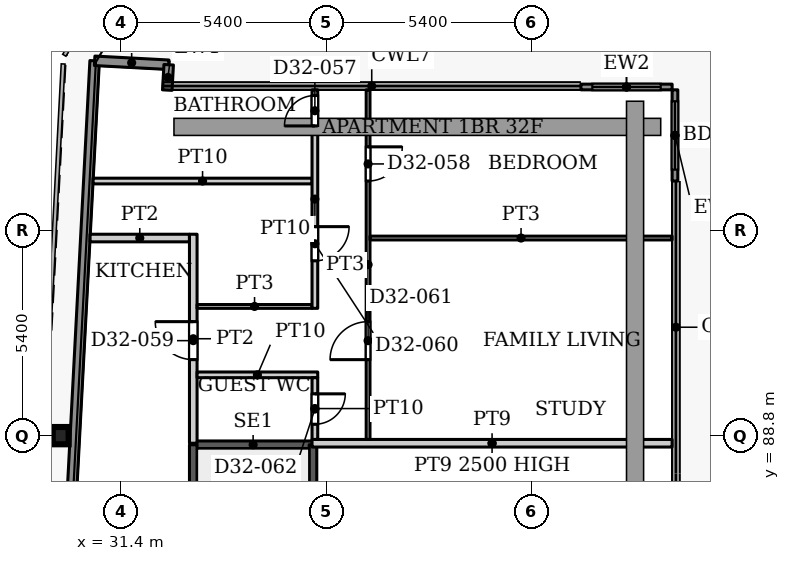
"""IFC4 building model, lengths in metres.
Left out: names, types, materials, properties, quantities, classifications, styles, units other than length and angle.
Written with IfcOpenShell. Run it as: python <this file> out.ifc"""

import sys

from ifc_helpers import new_model, si_unit, direction, frame, frame_2d, origin, origin_2d, place, context, subcontext, project, spatial, rectangle, i_section, extrude, source, transform, mapped, element, fill, save


model = new_model("IFC4")
c1 = context("Model", 3, precision=1e-05, world=origin(), true_north=direction((0.0, 1.0)))
c2 = subcontext(c1, "Body", "Model", "MODEL_VIEW")
j1 = project(units=[si_unit("LENGTHUNIT", "METRE"), si_unit("PLANEANGLEUNIT", "RADIAN")], contexts=[c1])
p1 = place(None, origin())
s1 = spatial("IfcSite", under=j1, at=p1, CompositionType="ELEMENT")
p2 = place(p1, origin())
s2 = spatial("IfcBuilding", under=s1, at=p2, CompositionType="ELEMENT")
p3 = place(p2, frame((0.0, 0.0, 137.0)))
s3 = spatial("IfcBuildingStorey", under=s2, at=p3, CompositionType="ELEMENT", Elevation=137.0)
p4 = place(p3, frame((29.811, 88.8, 0.0), z_axis=(0.0, 0.0, 1.0), x_axis=(1.0, 0.0, 0.0)))
e1 = element("IfcColumn", 1, at=p4, inside=s3, PredefinedType="COLUMN", context=c2, shape_type="SweptSolid", body=[
    extrude(i_section(OverallWidth=0.418, OverallDepth=0.455, WebThickness=0.042, FlangeThickness=0.068, FilletRadius=0.014, at=origin_2d()), origin(), (0.0, 0.0, 1.0), 3.9),
])
p5 = place(p3, frame((27.195, 31.969, 0.0), z_axis=(0.0, 0.0, 1.0), x_axis=(0.052554995867, 0.998618031286, 0.0)))
e2 = element("IfcWall", 2, at=p5, inside=s3, PredefinedType="SOLIDWALL", context=c2, shape_type="SweptSolid", body=[
    extrude(rectangle(XDim=66.787, YDim=0.25, at=frame_2d((33.394, 0.0))), origin(), (0.0, 0.0, 1.0), 3.75),
])
p6 = place(p3, frame((30.705, 98.664, 0.0), z_axis=(0.0, 0.0, 1.0), x_axis=(0.998577785791, -0.053314216913, 0.0)))
e3 = element("IfcWall", 3, at=p6, inside=s3, PredefinedType="SOLIDWALL", context=c2, shape_type="SweptSolid", body=[
    extrude(rectangle(XDim=1.951, YDim=0.25, at=frame_2d((0.975, 0.0))), origin(), (0.0, 0.0, 1.0), 3.75),
])
p7 = place(p3, frame((32.653, 98.56, 0.0), z_axis=(0.0, 0.0, 1.0), x_axis=(-0.054093451632, -0.998535877418, 0.0)))
e4 = element("IfcWall", 4, at=p7, inside=s3, PredefinedType="SOLIDWALL", context=c2, shape_type="SweptSolid", body=[
    extrude(rectangle(XDim=0.668, YDim=0.25, at=frame_2d((0.334, 0.0))), origin(), (0.0, 0.0, 1.0), 3.75),
])
p8 = place(p3, frame((43.5, 97.975, 0.0), z_axis=(0.0, 0.0, 1.0), x_axis=(1.0, 0.0, 0.0)))
e5 = element("IfcWall", 5, at=p8, inside=s3, PredefinedType="SOLIDWALL", context=c2, shape_type="SweptSolid", body=[
    extrude(rectangle(XDim=2.4, YDim=0.15, at=frame_2d((1.2, 0.0))), origin(), (0.0, 0.0, 1.0), 3.75),
])
p9 = place(p8, frame((0.3, 0.0, 0.0)))
e6 = element("IfcOpeningElement", 6, at=p9, cuts=e5, PredefinedType="OPENING", context=c2, shape_type="SweptSolid", body=[
    extrude(rectangle(XDim=1.8, YDim=2.4, at=frame_2d((0.9, 1.2))), frame((0.0, 0.085, 0.0), z_axis=(0.0, -1.0, 0.0), x_axis=(1.0, 0.0, 0.0)), (0.0, 0.0, 1.0), 0.17),
])
p10 = place(p3, frame((45.975, 97.9, 0.0), z_axis=(0.0, 0.0, 1.0), x_axis=(0.0, -1.0, 0.0)))
e7 = element("IfcWall", 7, at=p10, inside=s3, PredefinedType="SOLIDWALL", context=c2, shape_type="SweptSolid", body=[
    extrude(rectangle(XDim=2.4, YDim=0.15, at=frame_2d((1.2, 0.0))), origin(), (0.0, 0.0, 1.0), 3.75),
])
p11 = place(p10, frame((0.3, 0.0, 0.0)))
e8 = element("IfcOpeningElement", 8, at=p11, cuts=e7, PredefinedType="OPENING", context=c2, shape_type="SweptSolid", body=[
    extrude(rectangle(XDim=1.8, YDim=2.4, at=frame_2d((0.9, 1.2))), frame((0.0, 0.085, 0.0), z_axis=(0.0, -1.0, 0.0), x_axis=(1.0, 0.0, 0.0)), (0.0, 0.0, 1.0), 0.17),
])
p12 = place(p3, frame((33.3, 88.56, 0.0), z_axis=(0.0, 0.0, 1.0), x_axis=(1.0, 0.0, 0.0)))
e9 = element("IfcWall", 9, at=p12, inside=s3, PredefinedType="SHEAR", context=c2, shape_type="SweptSolid", body=[
    extrude(rectangle(XDim=3.15, YDim=0.2, at=frame_2d((1.575, 0.0))), origin(), (0.0, 0.0, 1.0), 3.9),
])
p13 = place(p3, frame((33.3, 79.4, 0.0), z_axis=(0.0, 0.0, 1.0), x_axis=(0.0, 1.0, 0.0)))
e10 = element("IfcWall", 10, at=p13, inside=s3, PredefinedType="SHEAR", context=c2, shape_type="SweptSolid", body=[
    extrude(rectangle(XDim=9.16, YDim=0.2, at=frame_2d((4.58, 0.0))), origin(), (0.0, 0.0, 1.0), 3.9),
])
p14 = place(p13, frame((0.35, 0.0, 0.0)))
e11 = element("IfcOpeningElement", 11, at=p14, cuts=e10, PredefinedType="OPENING", context=c2, shape_type="SweptSolid", body=[
    extrude(rectangle(XDim=1.1, YDim=2.2, at=frame_2d((0.55, 1.1))), frame((0.0, 0.11, 0.0), z_axis=(0.0, -1.0, 0.0), x_axis=(1.0, 0.0, 0.0)), (0.0, 0.0, 1.0), 0.22),
])
p15 = place(p3, frame((36.45, 79.4, 0.0), z_axis=(0.0, 0.0, 1.0), x_axis=(0.0, 1.0, 0.0)))
e12 = element("IfcWall", 12, at=p15, inside=s3, PredefinedType="SHEAR", context=c2, shape_type="SweptSolid", body=[
    extrude(rectangle(XDim=9.16, YDim=0.2, at=frame_2d((4.58, 0.0))), origin(), (0.0, 0.0, 1.0), 3.9),
])
p16 = place(p3, frame((30.664, 95.5, 0.0), z_axis=(0.0, 0.0, 1.0), x_axis=(1.0, 0.0, 0.0)))
e13 = element("IfcWall", 13, at=p16, inside=s3, PredefinedType="PARTITIONING", context=c2, shape_type="SweptSolid", body=[
    extrude(rectangle(XDim=5.761, YDim=0.15, at=frame_2d((2.88, 0.0))), origin(), (0.0, 0.0, 1.0), 3.6),
])
p17 = place(p3, frame((30.585, 94.0, 0.0), z_axis=(0.0, 0.0, 1.0), x_axis=(1.0, 0.0, 0.0)))
e14 = element("IfcWall", 14, at=p17, inside=s3, PredefinedType="PARTITIONING", context=c2, shape_type="SweptSolid", body=[
    extrude(rectangle(XDim=2.615, YDim=0.2, at=frame_2d((1.308, 0.0))), origin(), (0.0, 0.0, 1.0), 3.6),
])
p18 = place(p3, frame((33.3, 88.6, 0.0), z_axis=(0.0, 0.0, 1.0), x_axis=(0.0, 1.0, 0.0)))
e15 = element("IfcWall", 15, at=p18, inside=s3, PredefinedType="PARTITIONING", context=c2, shape_type="SweptSolid", body=[
    extrude(rectangle(XDim=5.5, YDim=0.2, at=frame_2d((2.75, 0.0))), origin(), (0.0, 0.0, 1.0), 3.6),
])
p19 = place(p18, frame((2.2, 0.0, 0.0)))
e16 = element("IfcOpeningElement", 16, at=p19, cuts=e15, PredefinedType="OPENING", context=c2, shape_type="SweptSolid", body=[
    extrude(rectangle(XDim=1.0, YDim=2.1, at=frame_2d((0.5, 1.05))), frame((0.0, 0.11, 0.0), z_axis=(0.0, -1.0, 0.0), x_axis=(1.0, 0.0, 0.0)), (0.0, 0.0, 1.0), 0.22),
])
p20 = place(p3, frame((33.4, 90.4, 0.0), z_axis=(0.0, 0.0, 1.0), x_axis=(1.0, 0.0, 0.0)))
e17 = element("IfcWall", 17, at=p20, inside=s3, PredefinedType="PARTITIONING", context=c2, shape_type="SweptSolid", body=[
    extrude(rectangle(XDim=3.175, YDim=0.15, at=frame_2d((1.587, 0.0))), origin(), (0.0, 0.0, 1.0), 3.6),
])
p21 = place(p3, frame((33.4, 92.2, 0.0), z_axis=(0.0, 0.0, 1.0), x_axis=(1.0, 0.0, 0.0)))
e18 = element("IfcWall", 18, at=p21, inside=s3, PredefinedType="PARTITIONING", context=c2, shape_type="SweptSolid", body=[
    extrude(rectangle(XDim=3.025, YDim=0.1, at=frame_2d((1.513, 0.0))), origin(), (0.0, 0.0, 1.0), 3.6),
])
p22 = place(p3, frame((36.425, 88.6, 0.0), z_axis=(0.0, 0.0, 1.0), x_axis=(1.0, 0.0, 0.0)))
e19 = element("IfcWall", 19, at=p22, inside=s3, PredefinedType="PARTITIONING", context=c2, shape_type="SweptSolid", body=[
    extrude(rectangle(XDim=9.475, YDim=0.2, at=frame_2d((4.737, 0.0))), origin(), (0.0, 0.0, 1.0), 2.5),
])
p23 = place(p3, frame((36.5, 88.7, 0.0), z_axis=(0.0, 0.0, 1.0), x_axis=(0.0, 1.0, 0.0)))
e20 = element("IfcWall", 20, at=p23, inside=s3, PredefinedType="PARTITIONING", context=c2, shape_type="SweptSolid", body=[
    extrude(rectangle(XDim=1.625, YDim=0.15, at=frame_2d((0.812, 0.0))), origin(), (0.0, 0.0, 1.0), 3.6),
])
p24 = place(p23, frame((0.4, 0.0, 0.0)))
e21 = element("IfcOpeningElement", 21, at=p24, cuts=e20, PredefinedType="OPENING", context=c2, shape_type="SweptSolid", body=[
    extrude(rectangle(XDim=0.8, YDim=2.1, at=frame_2d((0.4, 1.05))), frame((0.0, 0.085, 0.0), z_axis=(0.0, -1.0, 0.0), x_axis=(1.0, 0.0, 0.0)), (0.0, 0.0, 1.0), 0.17),
])
p25 = place(p3, frame((36.5, 92.15, 0.0), z_axis=(0.0, 0.0, 1.0), x_axis=(0.0, 1.0, 0.0)))
e22 = element("IfcWall", 22, at=p25, inside=s3, PredefinedType="PARTITIONING", context=c2, shape_type="SweptSolid", body=[
    extrude(rectangle(XDim=5.75, YDim=0.15, at=frame_2d((2.875, 0.0))), origin(), (0.0, 0.0, 1.0), 3.6),
])
p26 = place(p25, frame((4.8, 0.0, 0.0)))
e23 = element("IfcOpeningElement", 23, at=p26, cuts=e22, PredefinedType="OPENING", context=c2, shape_type="SweptSolid", body=[
    extrude(rectangle(XDim=0.8, YDim=2.1, at=frame_2d((0.4, 1.05))), frame((0.0, 0.085, 0.0), z_axis=(0.0, -1.0, 0.0), x_axis=(1.0, 0.0, 0.0)), (0.0, 0.0, 1.0), 0.17),
])
p27 = place(p25, frame((1.25, 0.0, 0.0)))
e24 = element("IfcOpeningElement", 24, at=p27, cuts=e22, PredefinedType="OPENING", context=c2, shape_type="SweptSolid", body=[
    extrude(rectangle(XDim=0.9, YDim=2.1, at=frame_2d((0.45, 1.05))), frame((0.0, 0.085, 0.0), z_axis=(0.0, -1.0, 0.0), x_axis=(1.0, 0.0, 0.0)), (0.0, 0.0, 1.0), 0.17),
])
p28 = place(p3, frame((37.9, 88.7, 0.0), z_axis=(0.0, 0.0, 1.0), x_axis=(0.0, 1.0, 0.0)))
e25 = element("IfcWall", 25, at=p28, inside=s3, PredefinedType="PARTITIONING", context=c2, shape_type="SweptSolid", body=[
    extrude(rectangle(XDim=9.2, YDim=0.1, at=frame_2d((4.6, 0.0))), origin(), (0.0, 0.0, 1.0), 3.6),
])
p29 = place(p28, frame((6.8, 0.0, 0.0)))
e26 = element("IfcOpeningElement", 26, at=p29, cuts=e25, PredefinedType="OPENING", context=c2, shape_type="SweptSolid", body=[
    extrude(rectangle(XDim=0.9, YDim=2.1, at=frame_2d((0.45, 1.05))), frame((0.0, 0.06, 0.0), z_axis=(0.0, -1.0, 0.0), x_axis=(1.0, 0.0, 0.0)), (0.0, 0.0, 1.0), 0.12),
])
p30 = place(p28, frame((2.1, 0.0, 0.0)))
e27 = element("IfcOpeningElement", 27, at=p30, cuts=e25, PredefinedType="OPENING", context=c2, shape_type="SweptSolid", body=[
    extrude(rectangle(XDim=1.0, YDim=2.1, at=frame_2d((0.5, 1.05))), frame((0.0, 0.06, 0.0), z_axis=(0.0, -1.0, 0.0), x_axis=(1.0, 0.0, 0.0)), (0.0, 0.0, 1.0), 0.12),
])
p31 = place(p3, frame((37.95, 94.0, 0.0), z_axis=(0.0, 0.0, 1.0), x_axis=(1.0, 0.0, 0.0)))
e28 = element("IfcWall", 28, at=p31, inside=s3, PredefinedType="PARTITIONING", context=c2, shape_type="SweptSolid", body=[
    extrude(rectangle(XDim=7.95, YDim=0.1, at=frame_2d((3.975, 0.0))), origin(), (0.0, 0.0, 1.0), 3.6),
])
m1 = source(origin(), c2, "Body", "SweptSolid", [
    extrude(rectangle(XDim=1.8, YDim=2.4, at=frame_2d((0.9, 1.2))), frame((0.0, 0.025, 0.0), z_axis=(0.0, -1.0, 0.0), x_axis=(1.0, 0.0, 0.0)), (0.0, 0.0, 1.0), 0.05),
])
p32 = place(p9, origin())
e29 = element("IfcDoor", 29, at=p32, inside=s3, OperationType="SLIDING_TO_LEFT", PredefinedType="DOOR", context=c2, shape_type="MappedRepresentation", body=[
    mapped(m1, transform((0.0, 0.0, 0.0), x_axis=(1.0, 0.0, 0.0), y_axis=(0.0, 1.0, 0.0), z_axis=(0.0, 0.0, 1.0), scale=1.0)),
])
fill(e6, e29)
p33 = place(p11, origin())
e30 = element("IfcDoor", 30, at=p33, inside=s3, OperationType="SLIDING_TO_LEFT", PredefinedType="DOOR", context=c2, shape_type="MappedRepresentation", body=[
    mapped(m1, transform((0.0, 0.0, 0.0), x_axis=(1.0, 0.0, 0.0), y_axis=(0.0, 1.0, 0.0), z_axis=(0.0, 0.0, 1.0), scale=1.0)),
])
fill(e8, e30)
m2 = source(origin(), c2, "Body", "SweptSolid", [
    extrude(rectangle(XDim=0.8, YDim=2.1, at=frame_2d((0.4, 1.05))), frame((0.0, 0.025, 0.0), z_axis=(0.0, -1.0, 0.0), x_axis=(1.0, 0.0, 0.0)), (0.0, 0.0, 1.0), 0.05),
])
p34 = place(p26, origin())
e31 = element("IfcDoor", 31, at=p34, inside=s3, OperationType="SINGLE_SWING_LEFT", PredefinedType="DOOR", context=c2, shape_type="MappedRepresentation", body=[
    mapped(m2, transform((0.0, 0.0, 0.0), x_axis=(1.0, 0.0, 0.0), y_axis=(0.0, 1.0, 0.0), z_axis=(0.0, 0.0, 1.0), scale=1.0)),
])
fill(e23, e31)
m3 = source(origin(), c2, "Body", "SweptSolid", [
    extrude(rectangle(XDim=0.9, YDim=2.1, at=frame_2d((0.45, 1.05))), frame((0.0, 0.025, 0.0), z_axis=(0.0, -1.0, 0.0), x_axis=(1.0, 0.0, 0.0)), (0.0, 0.0, 1.0), 0.05),
])
p35 = place(p29, origin())
e32 = element("IfcDoor", 32, at=p35, inside=s3, OperationType="SINGLE_SWING_RIGHT", PredefinedType="DOOR", context=c2, shape_type="MappedRepresentation", body=[
    mapped(m3, transform((0.0, 0.0, 0.0), x_axis=(1.0, 0.0, 0.0), y_axis=(0.0, 1.0, 0.0), z_axis=(0.0, 0.0, 1.0), scale=1.0)),
])
fill(e26, e32)
m4 = source(origin(), c2, "Body", "SweptSolid", [
    extrude(rectangle(XDim=1.0, YDim=2.1, at=frame_2d((0.5, 1.05))), frame((0.0, 0.025, 0.0), z_axis=(0.0, -1.0, 0.0), x_axis=(1.0, 0.0, 0.0)), (0.0, 0.0, 1.0), 0.05),
])
p36 = place(p19, origin())
e33 = element("IfcDoor", 33, at=p36, inside=s3, OperationType="SINGLE_SWING_LEFT", PredefinedType="DOOR", context=c2, shape_type="MappedRepresentation", body=[
    mapped(m4, transform((0.0, 0.0, 0.0), x_axis=(1.0, 0.0, 0.0), y_axis=(0.0, 1.0, 0.0), z_axis=(0.0, 0.0, 1.0), scale=1.0)),
])
fill(e16, e33)
p37 = place(p27, origin())
e34 = element("IfcDoor", 34, at=p37, inside=s3, OperationType="SINGLE_SWING_RIGHT", PredefinedType="DOOR", context=c2, shape_type="MappedRepresentation", body=[
    mapped(m3, transform((0.0, 0.0, 0.0), x_axis=(1.0, 0.0, 0.0), y_axis=(0.0, 1.0, 0.0), z_axis=(0.0, 0.0, 1.0), scale=1.0)),
])
fill(e24, e34)
m5 = source(origin(), c2, "Body", "SweptSolid", [
    extrude(rectangle(XDim=1.0, YDim=2.1, at=frame_2d((0.5, 1.05))), frame((0.0, 0.025, 0.0), z_axis=(0.0, -1.0, 0.0), x_axis=(1.0, 0.0, 0.0)), (0.0, 0.0, 1.0), 0.05),
])
p38 = place(p30, origin())
e35 = element("IfcDoor", 35, at=p38, inside=s3, OperationType="SINGLE_SWING_LEFT", PredefinedType="DOOR", context=c2, shape_type="MappedRepresentation", body=[
    mapped(m5, transform((0.0, 0.0, 0.0), x_axis=(1.0, 0.0, 0.0), y_axis=(0.0, 1.0, 0.0), z_axis=(0.0, 0.0, 1.0), scale=1.0)),
])
fill(e27, e35)
p39 = place(p24, origin())
e36 = element("IfcDoor", 36, at=p39, inside=s3, OperationType="SINGLE_SWING_RIGHT", PredefinedType="DOOR", context=c2, shape_type="MappedRepresentation", body=[
    mapped(m2, transform((0.0, 0.0, 0.0), x_axis=(1.0, 0.0, 0.0), y_axis=(0.0, 1.0, 0.0), z_axis=(0.0, 0.0, 1.0), scale=1.0)),
])
fill(e21, e36)
save(model, sys.argv[1])
